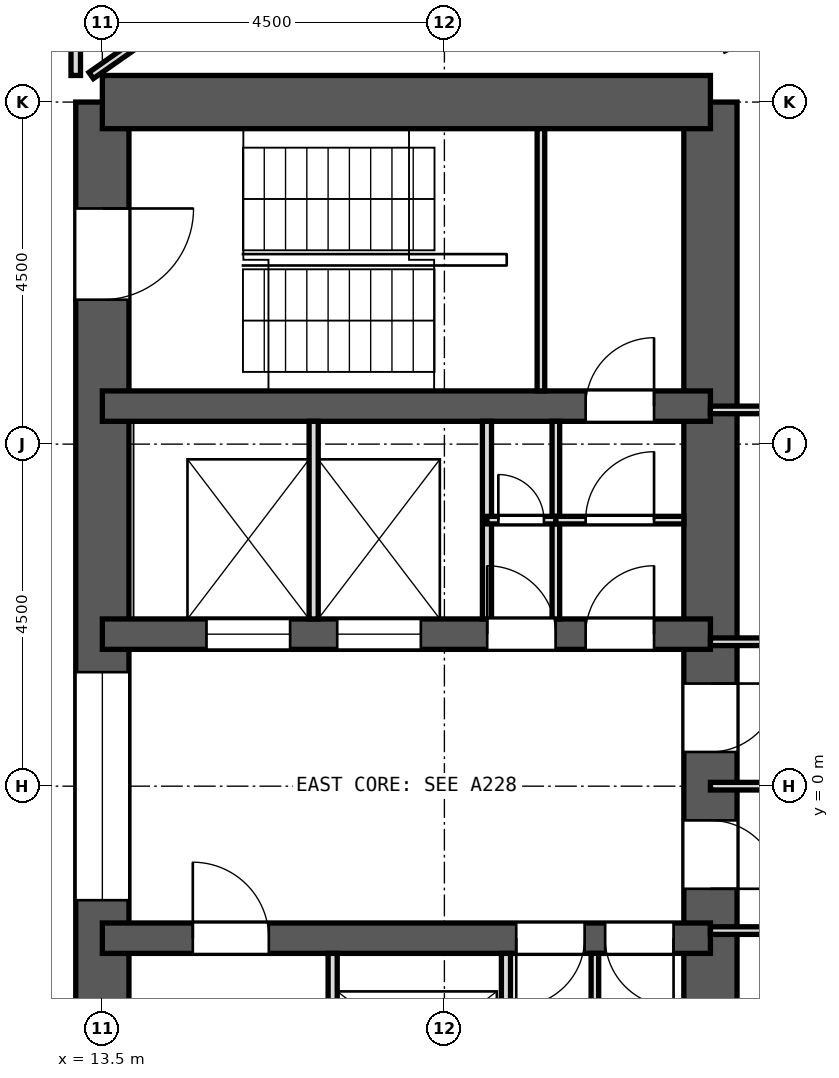
"""IFC4 building model, lengths in metres.
Left out: names, types, materials, properties, quantities, classifications, styles, units other than length and angle.
Written with IfcOpenShell. Run it as: python <this file> out.ifc"""

import sys

from ifc_helpers import new_model, si_unit, direction, frame, frame_2d, origin, place, context, subcontext, project, spatial, rectangle, extrude, element, fill, save


model = new_model("IFC4")
c1 = context("Model", 3, precision=1e-05, world=origin(), true_north=direction((0.0, 1.0)))
c2 = subcontext(c1, "Body", "Model", "MODEL_VIEW")
j1 = project(units=[si_unit("LENGTHUNIT", "METRE"), si_unit("PLANEANGLEUNIT", "RADIAN")], contexts=[c1])
p1 = place(None, origin())
s1 = spatial("IfcSite", under=j1, at=p1, CompositionType="ELEMENT")
p2 = place(p1, origin())
s2 = spatial("IfcBuilding", under=s1, at=p2, CompositionType="ELEMENT")
p3 = place(p2, frame((0.0, 0.0, 190.5)))
s3 = spatial("IfcBuildingStorey", under=s2, at=p3, CompositionType="ELEMENT", Elevation=190.5)
p4 = place(p3, frame((13.5, -9.0, 0.0), z_axis=(0.0, 0.0, 1.0), x_axis=(0.0, 1.0, 0.0)))
e1 = element("IfcWall", 1, at=p4, inside=s3, PredefinedType="SHEAR", context=c2, shape_type="SweptSolid", body=[
    extrude(rectangle(XDim=18.0, YDim=0.7, at=frame_2d((9.0, 0.0))), origin(), (0.0, 0.0, 1.0), 3.3),
])
p5 = place(p4, frame((15.4, 0.0, 0.0)))
e2 = element("IfcOpeningElement", 2, at=p5, cuts=e1, PredefinedType="OPENING", context=c2, shape_type="SweptSolid", body=[
    extrude(rectangle(XDim=1.2, YDim=2.1, at=frame_2d((0.6, 1.05))), frame((0.0, 0.362, 0.0), z_axis=(0.0, -1.0, 0.0), x_axis=(1.0, 0.0, 0.0)), (0.0, 0.0, 1.0), 0.724),
])
p6 = place(p4, frame((1.4, 0.0, 0.0)))
e3 = element("IfcOpeningElement", 3, at=p6, cuts=e1, PredefinedType="OPENING", context=c2, shape_type="SweptSolid", body=[
    extrude(rectangle(XDim=1.2, YDim=2.1, at=frame_2d((0.6, 1.05))), frame((0.0, 0.362, 0.0), z_axis=(0.0, -1.0, 0.0), x_axis=(1.0, 0.0, 0.0)), (0.0, 0.0, 1.0), 0.724),
])
p7 = place(p4, frame((7.5, 0.0, 0.0)))
e4 = element("IfcOpeningElement", 4, at=p7, cuts=e1, PredefinedType="OPENING", context=c2, shape_type="SweptSolid", body=[
    extrude(rectangle(XDim=3.0, YDim=2.4, at=frame_2d((1.5, 1.2))), frame((0.0, 0.362, 0.0), z_axis=(0.0, -1.0, 0.0), x_axis=(1.0, 0.0, 0.0)), (0.0, 0.0, 1.0), 0.724),
])
p8 = place(p3, frame((21.5, -9.0, 0.0), z_axis=(0.0, 0.0, 1.0), x_axis=(0.0, 1.0, 0.0)))
e5 = element("IfcWall", 5, at=p8, inside=s3, PredefinedType="SHEAR", context=c2, shape_type="SweptSolid", body=[
    extrude(rectangle(XDim=18.0, YDim=0.7, at=frame_2d((9.0, 0.0))), origin(), (0.0, 0.0, 1.0), 3.3),
])
p9 = place(p8, frame((9.45, 0.0, 0.0)))
e6 = element("IfcOpeningElement", 6, at=p9, cuts=e5, PredefinedType="OPENING", context=c2, shape_type="SweptSolid", body=[
    extrude(rectangle(XDim=0.9, YDim=2.1, at=frame_2d((0.45, 1.05))), frame((0.0, 0.362, 0.0), z_axis=(0.0, -1.0, 0.0), x_axis=(1.0, 0.0, 0.0)), (0.0, 0.0, 1.0), 0.724),
])
p10 = place(p8, frame((7.65, 0.0, 0.0)))
e7 = element("IfcOpeningElement", 7, at=p10, cuts=e5, PredefinedType="OPENING", context=c2, shape_type="SweptSolid", body=[
    extrude(rectangle(XDim=0.9, YDim=2.1, at=frame_2d((0.45, 1.05))), frame((0.0, 0.362, 0.0), z_axis=(0.0, -1.0, 0.0), x_axis=(1.0, 0.0, 0.0)), (0.0, 0.0, 1.0), 0.724),
])
p11 = place(p3, frame((13.5, 9.0, 0.0), z_axis=(0.0, 0.0, 1.0), x_axis=(1.0, 0.0, 0.0)))
e8 = element("IfcWall", 8, at=p11, inside=s3, PredefinedType="SHEAR", context=c2, shape_type="SweptSolid", body=[
    extrude(rectangle(XDim=8.0, YDim=0.7, at=frame_2d((4.0, 0.0))), origin(), (0.0, 0.0, 1.0), 3.3),
])
p12 = place(p3, frame((13.5, 5.0, 0.0), z_axis=(0.0, 0.0, 1.0), x_axis=(1.0, 0.0, 0.0)))
e9 = element("IfcWall", 9, at=p12, inside=s3, PredefinedType="SHEAR", context=c2, shape_type="SweptSolid", body=[
    extrude(rectangle(XDim=8.0, YDim=0.4, at=frame_2d((4.0, 0.0))), origin(), (0.0, 0.0, 1.0), 3.3),
])
p13 = place(p12, frame((6.358, 0.0, 0.0)))
e10 = element("IfcOpeningElement", 10, at=p13, cuts=e9, PredefinedType="OPENING", context=c2, shape_type="SweptSolid", body=[
    extrude(rectangle(XDim=0.9, YDim=2.1, at=frame_2d((0.45, 1.05))), frame((0.0, 0.212, 0.0), z_axis=(0.0, -1.0, 0.0), x_axis=(1.0, 0.0, 0.0)), (0.0, 0.0, 1.0), 0.424),
])
p14 = place(p3, frame((13.5, 2.0, 0.0), z_axis=(0.0, 0.0, 1.0), x_axis=(1.0, 0.0, 0.0)))
e11 = element("IfcWall", 11, at=p14, inside=s3, PredefinedType="SHEAR", context=c2, shape_type="SweptSolid", body=[
    extrude(rectangle(XDim=8.0, YDim=0.4, at=frame_2d((4.0, 0.0))), origin(), (0.0, 0.0, 1.0), 3.3),
])
p15 = place(p14, frame((1.37, 0.0, 0.0)))
e12 = element("IfcOpeningElement", 12, at=p15, cuts=e11, PredefinedType="OPENING", context=c2, shape_type="SweptSolid", body=[
    extrude(rectangle(XDim=1.1, YDim=2.1, at=frame_2d((0.55, 1.05))), frame((0.0, 0.212, 0.0), z_axis=(0.0, -1.0, 0.0), x_axis=(1.0, 0.0, 0.0)), (0.0, 0.0, 1.0), 0.424),
])
p16 = place(p14, frame((3.09, 0.0, 0.0)))
e13 = element("IfcOpeningElement", 13, at=p16, cuts=e11, PredefinedType="OPENING", context=c2, shape_type="SweptSolid", body=[
    extrude(rectangle(XDim=1.1, YDim=2.1, at=frame_2d((0.55, 1.05))), frame((0.0, 0.212, 0.0), z_axis=(0.0, -1.0, 0.0), x_axis=(1.0, 0.0, 0.0)), (0.0, 0.0, 1.0), 0.424),
])
p17 = place(p14, frame((5.063, 0.0, 0.0)))
e14 = element("IfcOpeningElement", 14, at=p17, cuts=e11, PredefinedType="OPENING", context=c2, shape_type="SweptSolid", body=[
    extrude(rectangle(XDim=0.9, YDim=2.1, at=frame_2d((0.45, 1.05))), frame((0.0, 0.212, 0.0), z_axis=(0.0, -1.0, 0.0), x_axis=(1.0, 0.0, 0.0)), (0.0, 0.0, 1.0), 0.424),
])
p18 = place(p14, frame((6.358, 0.0, 0.0)))
e15 = element("IfcOpeningElement", 15, at=p18, cuts=e11, PredefinedType="OPENING", context=c2, shape_type="SweptSolid", body=[
    extrude(rectangle(XDim=0.9, YDim=2.1, at=frame_2d((0.45, 1.05))), frame((0.0, 0.212, 0.0), z_axis=(0.0, -1.0, 0.0), x_axis=(1.0, 0.0, 0.0)), (0.0, 0.0, 1.0), 0.424),
])
p19 = place(p3, frame((13.5, -2.0, 0.0), z_axis=(0.0, 0.0, 1.0), x_axis=(1.0, 0.0, 0.0)))
e16 = element("IfcWall", 16, at=p19, inside=s3, PredefinedType="SHEAR", context=c2, shape_type="SweptSolid", body=[
    extrude(rectangle(XDim=8.0, YDim=0.4, at=frame_2d((4.0, 0.0))), origin(), (0.0, 0.0, 1.0), 3.3),
])
p20 = place(p19, frame((1.19, 0.0, 0.0)))
e17 = element("IfcOpeningElement", 17, at=p20, cuts=e16, PredefinedType="OPENING", context=c2, shape_type="SweptSolid", body=[
    extrude(rectangle(XDim=1.0, YDim=2.1, at=frame_2d((0.5, 1.05))), frame((0.0, 0.212, 0.0), z_axis=(0.0, -1.0, 0.0), x_axis=(1.0, 0.0, 0.0)), (0.0, 0.0, 1.0), 0.424),
])
p21 = place(p19, frame((5.445, 0.0, 0.0)))
e18 = element("IfcOpeningElement", 18, at=p21, cuts=e16, PredefinedType="OPENING", context=c2, shape_type="SweptSolid", body=[
    extrude(rectangle(XDim=0.9, YDim=2.1, at=frame_2d((0.45, 1.05))), frame((0.0, 0.212, 0.0), z_axis=(0.0, -1.0, 0.0), x_axis=(1.0, 0.0, 0.0)), (0.0, 0.0, 1.0), 0.424),
])
p22 = place(p19, frame((6.615, 0.0, 0.0)))
e19 = element("IfcOpeningElement", 19, at=p22, cuts=e16, PredefinedType="OPENING", context=c2, shape_type="SweptSolid", body=[
    extrude(rectangle(XDim=0.9, YDim=2.1, at=frame_2d((0.45, 1.05))), frame((0.0, 0.212, 0.0), z_axis=(0.0, -1.0, 0.0), x_axis=(1.0, 0.0, 0.0)), (0.0, 0.0, 1.0), 0.424),
])
p23 = place(p3, frame((13.353, 9.35, 0.0), z_axis=(0.0, 0.0, 1.0), x_axis=(0.819123426134, 0.573617305143, 0.0)))
e20 = element("IfcWall", 20, at=p23, inside=s3, PredefinedType="PARTITIONING", context=c2, shape_type="SweptSolid", body=[
    extrude(rectangle(XDim=3.278, YDim=0.1, at=frame_2d((1.639, 0.0))), origin(), (0.0, 0.0, 1.0), 2.85),
])
p24 = place(p3, frame((13.15, 9.35, 0.0), z_axis=(0.0, 0.0, 1.0), x_axis=(0.0, 1.0, 0.0)))
e21 = element("IfcWall", 21, at=p24, inside=s3, PredefinedType="PARTITIONING", context=c2, shape_type="SweptSolid", body=[
    extrude(rectangle(XDim=2.221, YDim=0.125, at=frame_2d((1.111, 0.0))), origin(), (0.0, 0.0, 1.0), 2.85),
])
p25 = place(p3, frame((21.5, 4.95, 0.0), z_axis=(0.0, 0.0, 1.0), x_axis=(1.0, 0.0, 0.0)))
e22 = element("IfcWall", 22, at=p25, inside=s3, PredefinedType="PARTITIONING", context=c2, shape_type="SweptSolid", body=[
    extrude(rectangle(XDim=2.307, YDim=0.1, at=frame_2d((1.153, 0.0))), origin(), (0.0, 0.0, 1.0), 2.85),
])
p26 = place(p3, frame((21.5, 1.9, 0.0), z_axis=(0.0, 0.0, 1.0), x_axis=(1.0, 0.0, 0.0)))
e23 = element("IfcWall", 23, at=p26, inside=s3, PredefinedType="PARTITIONING", context=c2, shape_type="SweptSolid", body=[
    extrude(rectangle(XDim=2.805, YDim=0.1, at=frame_2d((1.402, 0.0))), origin(), (0.0, 0.0, 1.0), 2.85),
])
p27 = place(p26, frame((0.952, 0.0, 0.0)))
e24 = element("IfcOpeningElement", 24, at=p27, cuts=e23, PredefinedType="OPENING", context=c2, shape_type="SweptSolid", body=[
    extrude(rectangle(XDim=0.9, YDim=2.1, at=frame_2d((0.45, 1.05))), frame((0.0, 0.062, 0.0), z_axis=(0.0, -1.0, 0.0), x_axis=(1.0, 0.0, 0.0)), (0.0, 0.0, 1.0), 0.124),
])
p28 = place(p3, frame((21.5, -1.9, 0.0), z_axis=(0.0, 0.0, 1.0), x_axis=(1.0, 0.0, 0.0)))
e25 = element("IfcWall", 25, at=p28, inside=s3, PredefinedType="PARTITIONING", context=c2, shape_type="SweptSolid", body=[
    extrude(rectangle(XDim=2.805, YDim=0.1, at=frame_2d((1.402, 0.0))), origin(), (0.0, 0.0, 1.0), 2.85),
])
p29 = place(p28, frame((0.952, 0.0, 0.0)))
e26 = element("IfcOpeningElement", 26, at=p29, cuts=e25, PredefinedType="OPENING", context=c2, shape_type="SweptSolid", body=[
    extrude(rectangle(XDim=0.9, YDim=2.1, at=frame_2d((0.45, 1.05))), frame((0.0, 0.062, 0.0), z_axis=(0.0, -1.0, 0.0), x_axis=(1.0, 0.0, 0.0)), (0.0, 0.0, 1.0), 0.124),
])
p30 = place(p3, frame((21.5, 0.0, 0.0), z_axis=(0.0, 0.0, 1.0), x_axis=(1.0, 0.0, 0.0)))
e27 = element("IfcWall", 27, at=p30, inside=s3, PredefinedType="PARTITIONING", context=c2, shape_type="SweptSolid", body=[
    extrude(rectangle(XDim=2.805, YDim=0.1, at=frame_2d((1.402, 0.0))), origin(), (0.0, 0.0, 1.0), 2.85),
])
for number, where, z_axis, x_axis in (
    (28, (16.28, 2.2, 0.0), (0.0, 0.0, 1.0), (0.0, 1.0, 0.0)),
    (29, (18.56, 2.2, 0.0), (0.0, 0.0, 1.0), (0.0, 1.0, 0.0)),
):
    element("IfcWall", number, at=place(p3, frame(where, z_axis=z_axis, x_axis=x_axis)), inside=s3, PredefinedType="PARTITIONING", context=c2, shape_type="SweptSolid", body=[
        extrude(rectangle(XDim=2.6, YDim=0.12, at=frame_2d((1.3, 0.0))), origin(), (0.0, 0.0, 1.0), 2.85),
    ])
p31 = place(p3, frame((19.467, 2.2, 0.0), z_axis=(0.0, 0.0, 1.0), x_axis=(0.0, 1.0, 0.0)))
e30 = element("IfcWall", 30, at=p31, inside=s3, PredefinedType="PARTITIONING", context=c2, shape_type="SweptSolid", body=[
    extrude(rectangle(XDim=2.6, YDim=0.1, at=frame_2d((1.3, 0.0))), origin(), (0.0, 0.0, 1.0), 2.85),
])
p32 = place(p3, frame((16.53, -4.8, 0.0), z_axis=(0.0, 0.0, 1.0), x_axis=(0.0, 1.0, 0.0)))
e31 = element("IfcWall", 31, at=p32, inside=s3, PredefinedType="PARTITIONING", context=c2, shape_type="SweptSolid", body=[
    extrude(rectangle(XDim=2.6, YDim=0.12, at=frame_2d((1.3, 0.0))), origin(), (0.0, 0.0, 1.0), 2.85),
])
p33 = place(p32, frame((0.75, 0.0, 0.0)))
e32 = element("IfcOpeningElement", 32, at=p33, cuts=e31, PredefinedType="OPENING", context=c2, shape_type="SweptSolid", body=[
    extrude(rectangle(XDim=1.1, YDim=2.1, at=frame_2d((0.55, 1.05))), frame((0.0, 0.072, 0.0), z_axis=(0.0, -1.0, 0.0), x_axis=(1.0, 0.0, 0.0)), (0.0, 0.0, 1.0), 0.144),
])
p34 = place(p3, frame((18.81, -4.8, 0.0), z_axis=(0.0, 0.0, 1.0), x_axis=(0.0, 1.0, 0.0)))
e33 = element("IfcWall", 33, at=p34, inside=s3, PredefinedType="PARTITIONING", context=c2, shape_type="SweptSolid", body=[
    extrude(rectangle(XDim=2.6, YDim=0.12, at=frame_2d((1.3, 0.0))), origin(), (0.0, 0.0, 1.0), 2.85),
])
p35 = place(p3, frame((19.98, -4.8, 0.0), z_axis=(0.0, 0.0, 1.0), x_axis=(0.0, 1.0, 0.0)))
e34 = element("IfcWall", 34, at=p35, inside=s3, PredefinedType="PARTITIONING", context=c2, shape_type="SweptSolid", body=[
    extrude(rectangle(XDim=2.6, YDim=0.1, at=frame_2d((1.3, 0.0))), origin(), (0.0, 0.0, 1.0), 2.85),
])
p36 = place(p3, frame((18.56, 3.5, 0.0), z_axis=(0.0, 0.0, 1.0), x_axis=(1.0, 0.0, 0.0)))
e35 = element("IfcWall", 35, at=p36, inside=s3, PredefinedType="PARTITIONING", context=c2, shape_type="SweptSolid", body=[
    extrude(rectangle(XDim=0.906, YDim=0.1, at=frame_2d((0.453, 0.0))), origin(), (0.0, 0.0, 1.0), 2.85),
])
p37 = place(p36, frame((0.15, 0.0, 0.0)))
e36 = element("IfcOpeningElement", 36, at=p37, cuts=e35, PredefinedType="OPENING", context=c2, shape_type="SweptSolid", body=[
    extrude(rectangle(XDim=0.6, YDim=2.1, at=frame_2d((0.3, 1.05))), frame((0.0, 0.062, 0.0), z_axis=(0.0, -1.0, 0.0), x_axis=(1.0, 0.0, 0.0)), (0.0, 0.0, 1.0), 0.124),
])
p38 = place(p3, frame((19.467, 3.5, 0.0), z_axis=(0.0, 0.0, 1.0), x_axis=(1.0, 0.0, 0.0)))
e37 = element("IfcWall", 37, at=p38, inside=s3, PredefinedType="PARTITIONING", context=c2, shape_type="SweptSolid", body=[
    extrude(rectangle(XDim=1.683, YDim=0.1, at=frame_2d((0.842, 0.0))), origin(), (0.0, 0.0, 1.0), 2.85),
])
p39 = place(p38, frame((0.392, 0.0, 0.0)))
e38 = element("IfcOpeningElement", 38, at=p39, cuts=e37, PredefinedType="OPENING", context=c2, shape_type="SweptSolid", body=[
    extrude(rectangle(XDim=0.9, YDim=2.1, at=frame_2d((0.45, 1.05))), frame((0.0, 0.062, 0.0), z_axis=(0.0, -1.0, 0.0), x_axis=(1.0, 0.0, 0.0)), (0.0, 0.0, 1.0), 0.124),
])
p40 = place(p3, frame((19.27, 5.2, 0.0), z_axis=(0.0, 0.0, 1.0), x_axis=(0.0, 1.0, 0.0)))
e39 = element("IfcWall", 39, at=p40, inside=s3, PredefinedType="PARTITIONING", context=c2, shape_type="SweptSolid", body=[
    extrude(rectangle(XDim=3.45, YDim=0.1, at=frame_2d((1.725, 0.0))), origin(), (0.0, 0.0, 1.0), 2.85),
])
p41 = place(p15, origin())
e40 = element("IfcDoor", 40, at=p41, inside=s3, OperationType="DOUBLE_DOOR_SLIDING", PredefinedType="DOOR", context=c2, shape_type="SweptSolid", body=[
    extrude(rectangle(XDim=1.1, YDim=2.1, at=frame_2d((0.55, 1.05))), frame((0.0, 0.025, 0.0), z_axis=(0.0, -1.0, 0.0), x_axis=(1.0, 0.0, 0.0)), (0.0, 0.0, 1.0), 0.05),
])
fill(e12, e40)
p42 = place(p16, origin())
e41 = element("IfcDoor", 41, at=p42, inside=s3, OperationType="DOUBLE_DOOR_SLIDING", PredefinedType="DOOR", context=c2, shape_type="SweptSolid", body=[
    extrude(rectangle(XDim=1.1, YDim=2.1, at=frame_2d((0.55, 1.05))), frame((0.0, 0.025, 0.0), z_axis=(0.0, -1.0, 0.0), x_axis=(1.0, 0.0, 0.0)), (0.0, 0.0, 1.0), 0.05),
])
fill(e13, e41)
p43 = place(p17, origin())
e42 = element("IfcDoor", 42, at=p43, inside=s3, OperationType="SINGLE_SWING_LEFT", PredefinedType="DOOR", context=c2, shape_type="SweptSolid", body=[
    extrude(rectangle(XDim=0.9, YDim=2.1, at=frame_2d((0.45, 1.05))), frame((0.0, 0.025, 0.0), z_axis=(0.0, -1.0, 0.0), x_axis=(1.0, 0.0, 0.0)), (0.0, 0.0, 1.0), 0.05),
])
fill(e14, e42)
p44 = place(p18, origin())
e43 = element("IfcDoor", 43, at=p44, inside=s3, OperationType="SINGLE_SWING_RIGHT", PredefinedType="DOOR", context=c2, shape_type="SweptSolid", body=[
    extrude(rectangle(XDim=0.9, YDim=2.1, at=frame_2d((0.45, 1.05))), frame((0.0, 0.025, 0.0), z_axis=(0.0, -1.0, 0.0), x_axis=(1.0, 0.0, 0.0)), (0.0, 0.0, 1.0), 0.05),
])
fill(e15, e43)
p45 = place(p20, origin())
e44 = element("IfcDoor", 44, at=p45, inside=s3, OperationType="SINGLE_SWING_LEFT", PredefinedType="DOOR", context=c2, shape_type="SweptSolid", body=[
    extrude(rectangle(XDim=1.0, YDim=2.1, at=frame_2d((0.5, 1.05))), frame((0.0, 0.025, 0.0), z_axis=(0.0, -1.0, 0.0), x_axis=(1.0, 0.0, 0.0)), (0.0, 0.0, 1.0), 0.05),
])
fill(e17, e44)
p46 = place(p21, frame((0.9, 0.0, 0.0), z_axis=(0.0, 0.0, 1.0), x_axis=(-1.0, 0.0, 0.0)))
e45 = element("IfcDoor", 45, at=p46, inside=s3, OperationType="SINGLE_SWING_RIGHT", PredefinedType="DOOR", context=c2, shape_type="SweptSolid", body=[
    extrude(rectangle(XDim=0.9, YDim=2.1, at=frame_2d((0.45, 1.05))), frame((0.0, 0.025, 0.0), z_axis=(0.0, -1.0, 0.0), x_axis=(1.0, 0.0, 0.0)), (0.0, 0.0, 1.0), 0.05),
])
fill(e18, e45)
p47 = place(p22, frame((0.9, 0.0, 0.0), z_axis=(0.0, 0.0, 1.0), x_axis=(-1.0, 0.0, 0.0)))
e46 = element("IfcDoor", 46, at=p47, inside=s3, OperationType="SINGLE_SWING_LEFT", PredefinedType="DOOR", context=c2, shape_type="SweptSolid", body=[
    extrude(rectangle(XDim=0.9, YDim=2.1, at=frame_2d((0.45, 1.05))), frame((0.0, 0.025, 0.0), z_axis=(0.0, -1.0, 0.0), x_axis=(1.0, 0.0, 0.0)), (0.0, 0.0, 1.0), 0.05),
])
fill(e19, e46)
p48 = place(p9, frame((0.9, 0.0, 0.0), z_axis=(0.0, 0.0, 1.0), x_axis=(-1.0, 0.0, 0.0)))
e47 = element("IfcDoor", 47, at=p48, inside=s3, OperationType="SINGLE_SWING_LEFT", PredefinedType="DOOR", context=c2, shape_type="SweptSolid", body=[
    extrude(rectangle(XDim=0.9, YDim=2.1, at=frame_2d((0.45, 1.05))), frame((0.0, 0.025, 0.0), z_axis=(0.0, -1.0, 0.0), x_axis=(1.0, 0.0, 0.0)), (0.0, 0.0, 1.0), 0.05),
])
fill(e6, e47)
p49 = place(p10, frame((0.9, 0.0, 0.0), z_axis=(0.0, 0.0, 1.0), x_axis=(-1.0, 0.0, 0.0)))
e48 = element("IfcDoor", 48, at=p49, inside=s3, OperationType="SINGLE_SWING_RIGHT", PredefinedType="DOOR", context=c2, shape_type="SweptSolid", body=[
    extrude(rectangle(XDim=0.9, YDim=2.1, at=frame_2d((0.45, 1.05))), frame((0.0, 0.025, 0.0), z_axis=(0.0, -1.0, 0.0), x_axis=(1.0, 0.0, 0.0)), (0.0, 0.0, 1.0), 0.05),
])
fill(e7, e48)
p50 = place(p37, origin())
e49 = element("IfcDoor", 49, at=p50, inside=s3, OperationType="SINGLE_SWING_LEFT", PredefinedType="DOOR", context=c2, shape_type="SweptSolid", body=[
    extrude(rectangle(XDim=0.6, YDim=2.1, at=frame_2d((0.3, 1.05))), frame((0.0, 0.025, 0.0), z_axis=(0.0, -1.0, 0.0), x_axis=(1.0, 0.0, 0.0)), (0.0, 0.0, 1.0), 0.05),
])
fill(e36, e49)
p51 = place(p39, origin())
e50 = element("IfcDoor", 50, at=p51, inside=s3, OperationType="SINGLE_SWING_RIGHT", PredefinedType="DOOR", context=c2, shape_type="SweptSolid", body=[
    extrude(rectangle(XDim=0.9, YDim=2.1, at=frame_2d((0.45, 1.05))), frame((0.0, 0.025, 0.0), z_axis=(0.0, -1.0, 0.0), x_axis=(1.0, 0.0, 0.0)), (0.0, 0.0, 1.0), 0.05),
])
fill(e38, e50)
p52 = place(p13, origin())
e51 = element("IfcDoor", 51, at=p52, inside=s3, OperationType="SINGLE_SWING_RIGHT", PredefinedType="DOOR", context=c2, shape_type="SweptSolid", body=[
    extrude(rectangle(XDim=0.9, YDim=2.1, at=frame_2d((0.45, 1.05))), frame((0.0, 0.025, 0.0), z_axis=(0.0, -1.0, 0.0), x_axis=(1.0, 0.0, 0.0)), (0.0, 0.0, 1.0), 0.05),
])
fill(e10, e51)
p53 = place(p5, frame((1.2, 0.0, 0.0), z_axis=(0.0, 0.0, 1.0), x_axis=(-1.0, 0.0, 0.0)))
e52 = element("IfcDoor", 52, at=p53, inside=s3, OperationType="SINGLE_SWING_LEFT", PredefinedType="DOOR", context=c2, shape_type="SweptSolid", body=[
    extrude(rectangle(XDim=1.2, YDim=2.1, at=frame_2d((0.6, 1.05))), frame((0.0, 0.025, 0.0), z_axis=(0.0, -1.0, 0.0), x_axis=(1.0, 0.0, 0.0)), (0.0, 0.0, 1.0), 0.05),
])
fill(e2, e52)
p54 = place(p7, origin())
e53 = element("IfcDoor", 53, at=p54, inside=s3, OperationType="DOUBLE_DOOR_SLIDING", PredefinedType="DOOR", context=c2, shape_type="SweptSolid", body=[
    extrude(rectangle(XDim=3.0, YDim=2.4, at=frame_2d((1.5, 1.2))), frame((0.0, 0.025, 0.0), z_axis=(0.0, -1.0, 0.0), x_axis=(1.0, 0.0, 0.0)), (0.0, 0.0, 1.0), 0.05),
])
fill(e4, e53)
save(model, sys.argv[1])
